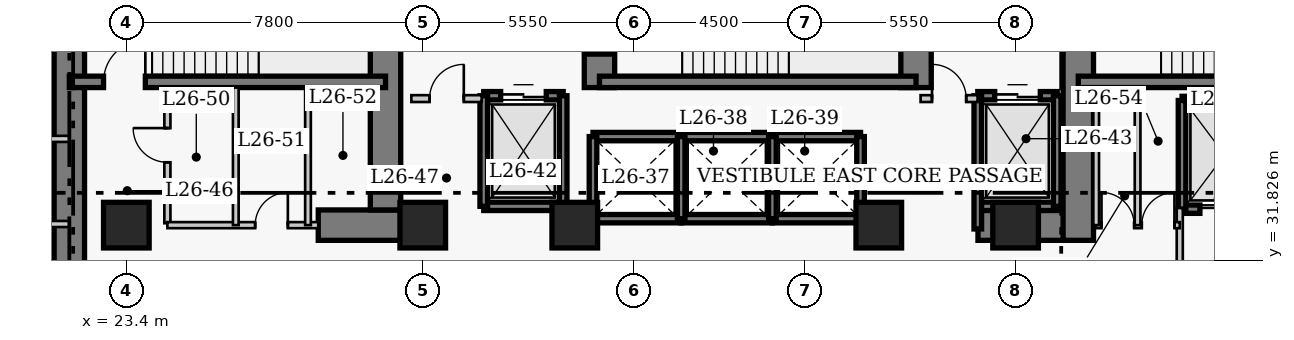
"""IFC4 building model, lengths in metres.
Left out: names, types, materials, properties, quantities, classifications, styles, units other than length and angle.
Written with IfcOpenShell. Run it as: python <this file> out.ifc"""

import sys

from ifc_helpers import new_model, si_unit, direction, frame, frame_2d, origin, origin_2d, place, context, subcontext, project, spatial, rectangle, extrude, element, fill, save


model = new_model("IFC4")
c1 = context("Model", 3, precision=1e-05, world=origin(), true_north=direction((0.0, 1.0)))
c2 = subcontext(c1, "Body", "Model", "MODEL_VIEW")
j1 = project(units=[si_unit("LENGTHUNIT", "METRE"), si_unit("PLANEANGLEUNIT", "RADIAN")], contexts=[c1])
p1 = place(None, origin())
s1 = spatial("IfcSite", under=j1, at=p1, CompositionType="ELEMENT")
p2 = place(p1, origin())
s2 = spatial("IfcBuilding", under=s1, at=p2, CompositionType="ELEMENT")
p3 = place(p2, frame((0.0, 0.0, 107.0)))
s3 = spatial("IfcBuildingStorey", under=s2, at=p3, CompositionType="ELEMENT", Elevation=107.0)
p4 = place(p3, frame((21.9, 27.05, 0.0), z_axis=(0.0, 0.0, 1.0), x_axis=(0.0, 1.0, 0.0)))
e1 = element("IfcWall", 1, at=p4, inside=s3, PredefinedType="SHEAR", context=c2, shape_type="SweptSolid", body=[
    extrude(rectangle(XDim=13.67, YDim=0.8, at=frame_2d((6.835, 0.0))), origin(), (0.0, 0.0, 1.0), 3.8),
])
p5 = place(p3, frame((28.45, 32.75, 0.0), z_axis=(0.0, 0.0, 1.0), x_axis=(1.0, 0.0, 0.0)))
e2 = element("IfcWall", 2, at=p5, inside=s3, PredefinedType="SHEAR", context=c2, shape_type="SweptSolid", body=[
    extrude(rectangle(XDim=2.4, YDim=0.8, at=frame_2d((1.2, 0.0))), origin(), (0.0, 0.0, 1.0), 3.8),
])
p6 = place(p3, frame((45.81, 32.75, 0.0), z_axis=(0.0, 0.0, 1.0), x_axis=(1.0, 0.0, 0.0)))
e3 = element("IfcWall", 3, at=p6, inside=s3, PredefinedType="SHEAR", context=c2, shape_type="SweptSolid", body=[
    extrude(rectangle(XDim=2.64, YDim=0.8, at=frame_2d((1.32, 0.0))), origin(), (0.0, 0.0, 1.0), 3.8),
])
p7 = place(p3, frame((30.22, 33.15, 0.0), z_axis=(0.0, 0.0, 1.0), x_axis=(0.0, 1.0, 0.0)))
e4 = element("IfcWall", 4, at=p7, inside=s3, PredefinedType="SHEAR", context=c2, shape_type="SweptSolid", body=[
    extrude(rectangle(XDim=7.17, YDim=0.8, at=frame_2d((3.585, 0.0))), origin(), (0.0, 0.0, 1.0), 3.8),
])
p8 = place(p3, frame((35.85, 36.37, 0.0), z_axis=(0.0, 0.0, 1.0), x_axis=(0.0, 1.0, 0.0)))
e5 = element("IfcWall", 5, at=p8, inside=s3, PredefinedType="SHEAR", context=c2, shape_type="SweptSolid", body=[
    extrude(rectangle(XDim=3.95, YDim=0.8, at=frame_2d((1.975, 0.0))), origin(), (0.0, 0.0, 1.0), 3.8),
])
p9 = place(p8, frame((0.88, 0.0, 0.0)))
e6 = element("IfcOpeningElement", 6, at=p9, cuts=e5, PredefinedType="OPENING", context=c2, shape_type="SweptSolid", body=[
    extrude(rectangle(XDim=1.1, YDim=2.15, at=frame_2d((0.55, 1.075))), frame((0.0, 0.41, 0.0), z_axis=(0.0, -1.0, 0.0), x_axis=(1.0, 0.0, 0.0)), (0.0, 0.0, 1.0), 0.82),
])
p10 = place(p3, frame((44.18, 36.37, 0.0), z_axis=(0.0, 0.0, 1.0), x_axis=(0.0, 1.0, 0.0)))
e7 = element("IfcWall", 7, at=p10, inside=s3, PredefinedType="SHEAR", context=c2, shape_type="SweptSolid", body=[
    extrude(rectangle(XDim=3.95, YDim=0.8, at=frame_2d((1.975, 0.0))), origin(), (0.0, 0.0, 1.0), 3.8),
])
p11 = place(p3, frame((48.45, 32.35, 0.0), z_axis=(0.0, 0.0, 1.0), x_axis=(0.0, 1.0, 0.0)))
e8 = element("IfcWall", 8, at=p11, inside=s3, PredefinedType="SHEAR", context=c2, shape_type="SweptSolid", body=[
    extrude(rectangle(XDim=7.97, YDim=0.8, at=frame_2d((3.985, 0.0))), origin(), (0.0, 0.0, 1.0), 3.8),
])
p12 = place(p11, frame((5.85, 0.0, 0.0)))
e9 = element("IfcOpeningElement", 9, at=p12, cuts=e8, PredefinedType="OPENING", context=c2, shape_type="SweptSolid", body=[
    extrude(rectangle(XDim=1.1, YDim=2.15, at=frame_2d((0.55, 1.075))), frame((0.0, 0.41, 0.0), z_axis=(0.0, -1.0, 0.0), x_axis=(1.0, 0.0, 0.0)), (0.0, 0.0, 1.0), 0.82),
])
p13 = place(p3, frame((21.9, 36.52, 0.0), z_axis=(0.0, 0.0, 1.0), x_axis=(1.0, 0.0, 0.0)))
e10 = element("IfcWall", 10, at=p13, inside=s3, PredefinedType="SHEAR", context=c2, shape_type="SweptSolid", body=[
    extrude(rectangle(XDim=8.32, YDim=0.3, at=frame_2d((4.16, 0.0))), origin(), (0.0, 0.0, 1.0), 3.8),
])
p14 = place(p13, frame((0.9, 0.0, 0.0)))
e11 = element("IfcOpeningElement", 11, at=p14, cuts=e10, PredefinedType="OPENING", context=c2, shape_type="SweptSolid", body=[
    extrude(rectangle(XDim=1.1, YDim=2.15, at=frame_2d((0.55, 1.075))), frame((0.0, 0.16, 0.0), z_axis=(0.0, -1.0, 0.0), x_axis=(1.0, 0.0, 0.0)), (0.0, 0.0, 1.0), 0.32),
])
p15 = place(p3, frame((35.85, 36.52, 0.0), z_axis=(0.0, 0.0, 1.0), x_axis=(1.0, 0.0, 0.0)))
e12 = element("IfcWall", 12, at=p15, inside=s3, PredefinedType="SHEAR", context=c2, shape_type="SweptSolid", body=[
    extrude(rectangle(XDim=8.33, YDim=0.3, at=frame_2d((4.165, 0.0))), origin(), (0.0, 0.0, 1.0), 3.8),
])
p16 = place(p3, frame((48.45, 36.52, 0.0), z_axis=(0.0, 0.0, 1.0), x_axis=(1.0, 0.0, 0.0)))
e13 = element("IfcWall", 13, at=p16, inside=s3, PredefinedType="SHEAR", context=c2, shape_type="SweptSolid", body=[
    extrude(rectangle(XDim=8.47, YDim=0.3, at=frame_2d((4.235, 0.0))), origin(), (0.0, 0.0, 1.0), 3.8),
])
for number, where, z_axis, x_axis in (
    (14, (23.4, 32.75, 0.0), (0.0, 0.0, 1.0), (1.0, 0.0, 0.0)),
    (15, (31.2, 32.75, 0.0), (0.0, 0.0, 1.0), (1.0, 0.0, 0.0)),
    (16, (35.2, 32.75, 0.0), (0.0, 0.0, 1.0), (1.0, 0.0, 0.0)),
    (17, (43.2, 32.75, 0.0), (0.0, 0.0, 1.0), (1.0, 0.0, 0.0)),
    (18, (46.8, 32.75, 0.0), (0.0, 0.0, 1.0), (1.0, 0.0, 0.0)),
):
    element("IfcColumn", number, at=place(p3, frame(where, z_axis=z_axis, x_axis=x_axis)), inside=s3, PredefinedType="COLUMN", context=c2, shape_type="SweptSolid", body=[
        extrude(rectangle(XDim=1.2, YDim=1.2, at=origin_2d()), origin(), (0.0, 0.0, 1.0), 3.8),
    ])
for number, where, z_axis, x_axis in (
    (19, (35.68, 35.08, 0.0), (0.0, 0.0, 1.0), (1.0, 0.0, 0.0)),
    (20, (35.68, 32.92, 0.0), (0.0, 0.0, 1.0), (1.0, 0.0, 0.0)),
):
    element("IfcWall", number, at=place(p3, frame(where, z_axis=z_axis, x_axis=x_axis)), inside=s3, PredefinedType="SHEAR", context=c2, shape_type="SweptSolid", body=[
        extrude(rectangle(XDim=2.32, YDim=0.22, at=frame_2d((1.16, 0.0))), origin(), (0.0, 0.0, 1.0), 3.8),
    ])
p17 = place(p3, frame((35.68, 32.92, 0.0), z_axis=(0.0, 0.0, 1.0), x_axis=(0.0, 1.0, 0.0)))
e21 = element("IfcWall", 21, at=p17, inside=s3, PredefinedType="SHEAR", context=c2, shape_type="SweptSolid", body=[
    extrude(rectangle(XDim=2.16, YDim=0.2, at=frame_2d((1.08, 0.0))), origin(), (0.0, 0.0, 1.0), 3.8),
])
for number, where, z_axis, x_axis in (
    (22, (38.0, 35.08, 0.0), (0.0, 0.0, 1.0), (1.0, 0.0, 0.0)),
    (23, (38.0, 32.92, 0.0), (0.0, 0.0, 1.0), (1.0, 0.0, 0.0)),
):
    element("IfcWall", number, at=place(p3, frame(where, z_axis=z_axis, x_axis=x_axis)), inside=s3, PredefinedType="SHEAR", context=c2, shape_type="SweptSolid", body=[
        extrude(rectangle(XDim=2.4, YDim=0.22, at=frame_2d((1.2, 0.0))), origin(), (0.0, 0.0, 1.0), 3.8),
    ])
p18 = place(p3, frame((38.0, 32.92, 0.0), z_axis=(0.0, 0.0, 1.0), x_axis=(0.0, 1.0, 0.0)))
e24 = element("IfcWall", 24, at=p18, inside=s3, PredefinedType="SHEAR", context=c2, shape_type="SweptSolid", body=[
    extrude(rectangle(XDim=2.16, YDim=0.2, at=frame_2d((1.08, 0.0))), origin(), (0.0, 0.0, 1.0), 3.8),
])
for number, where, z_axis, x_axis in (
    (25, (40.4, 35.08, 0.0), (0.0, 0.0, 1.0), (1.0, 0.0, 0.0)),
    (26, (40.4, 32.92, 0.0), (0.0, 0.0, 1.0), (1.0, 0.0, 0.0)),
):
    element("IfcWall", number, at=place(p3, frame(where, z_axis=z_axis, x_axis=x_axis)), inside=s3, PredefinedType="SHEAR", context=c2, shape_type="SweptSolid", body=[
        extrude(rectangle(XDim=2.32, YDim=0.22, at=frame_2d((1.16, 0.0))), origin(), (0.0, 0.0, 1.0), 3.8),
    ])
for number, where, z_axis, x_axis in (
    (27, (40.4, 32.92, 0.0), (0.0, 0.0, 1.0), (0.0, 1.0, 0.0)),
    (28, (42.72, 32.92, 0.0), (0.0, 0.0, 1.0), (0.0, 1.0, 0.0)),
):
    element("IfcWall", number, at=place(p3, frame(where, z_axis=z_axis, x_axis=x_axis)), inside=s3, PredefinedType="SHEAR", context=c2, shape_type="SweptSolid", body=[
        extrude(rectangle(XDim=2.16, YDim=0.2, at=frame_2d((1.08, 0.0))), origin(), (0.0, 0.0, 1.0), 3.8),
    ])
p19 = place(p3, frame((51.18, 36.03, 0.0), z_axis=(0.0, 0.0, 1.0), x_axis=(1.0, 0.0, 0.0)))
e29 = element("IfcWall", 29, at=p19, inside=s3, PredefinedType="SHEAR", context=c2, shape_type="SweptSolid", body=[
    extrude(rectangle(XDim=2.42, YDim=0.22, at=frame_2d((1.21, 0.0))), origin(), (0.0, 0.0, 1.0), 3.8),
])
p20 = place(p3, frame((51.18, 33.17, 0.0), z_axis=(0.0, 0.0, 1.0), x_axis=(1.0, 0.0, 0.0)))
e30 = element("IfcWall", 30, at=p20, inside=s3, PredefinedType="SHEAR", context=c2, shape_type="SweptSolid", body=[
    extrude(rectangle(XDim=2.42, YDim=0.22, at=frame_2d((1.21, 0.0))), origin(), (0.0, 0.0, 1.0), 3.8),
])
p21 = place(p20, frame((0.47, 0.0, 0.0)))
e31 = element("IfcOpeningElement", 31, at=p21, cuts=e30, PredefinedType="OPENING", context=c2, shape_type="SweptSolid", body=[
    extrude(rectangle(XDim=1.3, YDim=2.15, at=frame_2d((0.65, 1.075))), frame((0.0, 0.12, 0.0), z_axis=(0.0, -1.0, 0.0), x_axis=(1.0, 0.0, 0.0)), (0.0, 0.0, 1.0), 0.24),
])
p22 = place(p3, frame((51.18, 33.17, 0.0), z_axis=(0.0, 0.0, 1.0), x_axis=(0.0, 1.0, 0.0)))
e32 = element("IfcWall", 32, at=p22, inside=s3, PredefinedType="SHEAR", context=c2, shape_type="SweptSolid", body=[
    extrude(rectangle(XDim=2.86, YDim=0.2, at=frame_2d((1.43, 0.0))), origin(), (0.0, 0.0, 1.0), 3.8),
])
p23 = place(p3, frame((32.805, 36.155, 0.0), z_axis=(0.0, 0.0, 1.0), x_axis=(1.0, 0.0, 0.0)))
e33 = element("IfcWall", 33, at=p23, inside=s3, PredefinedType="SHEAR", context=c2, shape_type="SweptSolid", body=[
    extrude(rectangle(XDim=2.09, YDim=0.22, at=frame_2d((1.045, 0.0))), origin(), (0.0, 0.0, 1.0), 3.8),
])
p24 = place(p23, frame((0.445, 0.0, 0.0)))
e34 = element("IfcOpeningElement", 34, at=p24, cuts=e33, PredefinedType="OPENING", context=c2, shape_type="SweptSolid", body=[
    extrude(rectangle(XDim=1.2, YDim=2.15, at=frame_2d((0.6, 1.075))), frame((0.0, 0.12, 0.0), z_axis=(0.0, -1.0, 0.0), x_axis=(1.0, 0.0, 0.0)), (0.0, 0.0, 1.0), 0.24),
])
p25 = place(p3, frame((32.805, 33.245, 0.0), z_axis=(0.0, 0.0, 1.0), x_axis=(1.0, 0.0, 0.0)))
e35 = element("IfcWall", 35, at=p25, inside=s3, PredefinedType="SHEAR", context=c2, shape_type="SweptSolid", body=[
    extrude(rectangle(XDim=2.09, YDim=0.22, at=frame_2d((1.045, 0.0))), origin(), (0.0, 0.0, 1.0), 3.8),
])
for number, where, z_axis, x_axis in (
    (36, (32.805, 33.245, 0.0), (0.0, 0.0, 1.0), (0.0, 1.0, 0.0)),
    (37, (34.895, 33.245, 0.0), (0.0, 0.0, 1.0), (0.0, 1.0, 0.0)),
):
    element("IfcWall", number, at=place(p3, frame(where, z_axis=z_axis, x_axis=x_axis)), inside=s3, PredefinedType="SHEAR", context=c2, shape_type="SweptSolid", body=[
        extrude(rectangle(XDim=2.91, YDim=0.2, at=frame_2d((1.455, 0.0))), origin(), (0.0, 0.0, 1.0), 3.8),
    ])
p26 = place(p3, frame((45.805, 36.155, 0.0), z_axis=(0.0, 0.0, 1.0), x_axis=(1.0, 0.0, 0.0)))
e38 = element("IfcWall", 38, at=p26, inside=s3, PredefinedType="SHEAR", context=c2, shape_type="SweptSolid", body=[
    extrude(rectangle(XDim=2.09, YDim=0.22, at=frame_2d((1.045, 0.0))), origin(), (0.0, 0.0, 1.0), 3.8),
])
p27 = place(p26, frame((0.445, 0.0, 0.0)))
e39 = element("IfcOpeningElement", 39, at=p27, cuts=e38, PredefinedType="OPENING", context=c2, shape_type="SweptSolid", body=[
    extrude(rectangle(XDim=1.2, YDim=2.15, at=frame_2d((0.6, 1.075))), frame((0.0, 0.12, 0.0), z_axis=(0.0, -1.0, 0.0), x_axis=(1.0, 0.0, 0.0)), (0.0, 0.0, 1.0), 0.24),
])
p28 = place(p3, frame((45.805, 33.245, 0.0), z_axis=(0.0, 0.0, 1.0), x_axis=(1.0, 0.0, 0.0)))
e40 = element("IfcWall", 40, at=p28, inside=s3, PredefinedType="SHEAR", context=c2, shape_type="SweptSolid", body=[
    extrude(rectangle(XDim=2.09, YDim=0.22, at=frame_2d((1.045, 0.0))), origin(), (0.0, 0.0, 1.0), 3.8),
])
p29 = place(p3, frame((45.805, 32.65, 0.0), z_axis=(0.0, 0.0, 1.0), x_axis=(0.0, 1.0, 0.0)))
e41 = element("IfcWall", 41, at=p29, inside=s3, PredefinedType="SHEAR", context=c2, shape_type="SweptSolid", body=[
    extrude(rectangle(XDim=3.505, YDim=0.2, at=frame_2d((1.752, 0.0))), origin(), (0.0, 0.0, 1.0), 3.8),
])
p30 = place(p3, frame((47.895, 33.245, 0.0), z_axis=(0.0, 0.0, 1.0), x_axis=(0.0, 1.0, 0.0)))
e42 = element("IfcWall", 42, at=p30, inside=s3, PredefinedType="SHEAR", context=c2, shape_type="SweptSolid", body=[
    extrude(rectangle(XDim=2.91, YDim=0.2, at=frame_2d((1.455, 0.0))), origin(), (0.0, 0.0, 1.0), 3.8),
])
p31 = place(p3, frame((30.9, 36.08, 0.0), z_axis=(0.0, 0.0, 1.0), x_axis=(1.0, 0.0, 0.0)))
e43 = element("IfcWall", 43, at=p31, inside=s3, PredefinedType="PARTITIONING", context=c2, shape_type="SweptSolid", body=[
    extrude(rectangle(XDim=1.85, YDim=0.18, at=frame_2d((0.925, 0.0))), origin(), (0.0, 0.0, 1.0), 3.54),
])
p32 = place(p31, frame((0.48, 0.0, 0.0)))
e44 = element("IfcOpeningElement", 44, at=p32, cuts=e43, PredefinedType="OPENING", context=c2, shape_type="SweptSolid", body=[
    extrude(rectangle(XDim=0.9, YDim=2.15, at=frame_2d((0.45, 1.075))), frame((0.0, 0.1, 0.0), z_axis=(0.0, -1.0, 0.0), x_axis=(1.0, 0.0, 0.0)), (0.0, 0.0, 1.0), 0.2),
])
p33 = place(p3, frame((44.3, 36.08, 0.0), z_axis=(0.0, 0.0, 1.0), x_axis=(1.0, 0.0, 0.0)))
e45 = element("IfcWall", 45, at=p33, inside=s3, PredefinedType="PARTITIONING", context=c2, shape_type="SweptSolid", body=[
    extrude(rectangle(XDim=1.5, YDim=0.18, at=frame_2d((0.75, 0.0))), origin(), (0.0, 0.0, 1.0), 3.54),
])
p34 = place(p33, frame((0.3, 0.0, 0.0)))
e46 = element("IfcOpeningElement", 46, at=p34, cuts=e45, PredefinedType="OPENING", context=c2, shape_type="SweptSolid", body=[
    extrude(rectangle(XDim=0.9, YDim=2.15, at=frame_2d((0.45, 1.075))), frame((0.0, 0.1, 0.0), z_axis=(0.0, -1.0, 0.0), x_axis=(1.0, 0.0, 0.0)), (0.0, 0.0, 1.0), 0.2),
])
p35 = place(p3, frame((24.48, 32.8, 0.0), z_axis=(0.0, 0.0, 1.0), x_axis=(0.0, 1.0, 0.0)))
e47 = element("IfcWall", 47, at=p35, inside=s3, PredefinedType="PARTITIONING", context=c2, shape_type="SweptSolid", body=[
    extrude(rectangle(XDim=3.57, YDim=0.16, at=frame_2d((1.785, 0.0))), origin(), (0.0, 0.0, 1.0), 3.54),
])
p36 = place(p35, frame((1.604, 0.0, 0.0)))
e48 = element("IfcOpeningElement", 48, at=p36, cuts=e47, PredefinedType="OPENING", context=c2, shape_type="SweptSolid", body=[
    extrude(rectangle(XDim=0.9, YDim=2.1, at=frame_2d((0.45, 1.05))), frame((0.0, 0.09, 0.0), z_axis=(0.0, -1.0, 0.0), x_axis=(1.0, 0.0, 0.0)), (0.0, 0.0, 1.0), 0.18),
])
p37 = place(p3, frame((51.12, 29.5, 0.0), z_axis=(0.0, 0.0, 1.0), x_axis=(0.0, 1.0, 0.0)))
e49 = element("IfcWall", 49, at=p37, inside=s3, PredefinedType="PARTITIONING", context=c2, shape_type="SweptSolid", body=[
    extrude(rectangle(XDim=3.7, YDim=0.16, at=frame_2d((1.85, 0.0))), origin(), (0.0, 0.0, 1.0), 3.54),
])
p38 = place(p37, frame((0.9, 0.0, 0.0)))
e50 = element("IfcOpeningElement", 50, at=p38, cuts=e49, PredefinedType="OPENING", context=c2, shape_type="SweptSolid", body=[
    extrude(rectangle(XDim=1.1, YDim=2.15, at=frame_2d((0.55, 1.075))), frame((0.0, 0.09, 0.0), z_axis=(0.0, -1.0, 0.0), x_axis=(1.0, 0.0, 0.0)), (0.0, 0.0, 1.0), 0.18),
])
p39 = place(p3, frame((24.48, 32.75, 0.0), z_axis=(0.0, 0.0, 1.0), x_axis=(1.0, 0.0, 0.0)))
e51 = element("IfcWall", 51, at=p39, inside=s3, PredefinedType="PARTITIONING", context=c2, shape_type="SweptSolid", body=[
    extrude(rectangle(XDim=3.97, YDim=0.16, at=frame_2d((1.985, 0.0))), origin(), (0.0, 0.0, 1.0), 3.54),
])
p40 = place(p39, frame((2.31, 0.0, 0.0)))
e52 = element("IfcOpeningElement", 52, at=p40, cuts=e51, PredefinedType="OPENING", context=c2, shape_type="SweptSolid", body=[
    extrude(rectangle(XDim=0.86, YDim=2.05, at=frame_2d((0.43, 1.025))), frame((0.0, 0.09, 0.0), z_axis=(0.0, -1.0, 0.0), x_axis=(1.0, 0.0, 0.0)), (0.0, 0.0, 1.0), 0.18),
])
p41 = place(p3, frame((48.92, 32.75, 0.0), z_axis=(0.0, 0.0, 1.0), x_axis=(1.0, 0.0, 0.0)))
e53 = element("IfcWall", 53, at=p41, inside=s3, PredefinedType="PARTITIONING", context=c2, shape_type="SweptSolid", body=[
    extrude(rectangle(XDim=2.2, YDim=0.16, at=frame_2d((1.1, 0.0))), origin(), (0.0, 0.0, 1.0), 3.54),
])
p42 = place(p41, frame((0.14, 0.0, 0.0)))
e54 = element("IfcOpeningElement", 54, at=p42, cuts=e53, PredefinedType="OPENING", context=c2, shape_type="SweptSolid", body=[
    extrude(rectangle(XDim=0.86, YDim=2.05, at=frame_2d((0.43, 1.025))), frame((0.0, 0.09, 0.0), z_axis=(0.0, -1.0, 0.0), x_axis=(1.0, 0.0, 0.0)), (0.0, 0.0, 1.0), 0.18),
])
p43 = place(p41, frame((1.2, 0.0, 0.0)))
e55 = element("IfcOpeningElement", 55, at=p43, cuts=e53, PredefinedType="OPENING", context=c2, shape_type="SweptSolid", body=[
    extrude(rectangle(XDim=0.86, YDim=2.05, at=frame_2d((0.43, 1.025))), frame((0.0, 0.09, 0.0), z_axis=(0.0, -1.0, 0.0), x_axis=(1.0, 0.0, 0.0)), (0.0, 0.0, 1.0), 0.18),
])
for number, where, z_axis, x_axis in (
    (56, (48.92, 32.75, 0.0), (0.0, 0.0, 1.0), (0.0, 1.0, 0.0)),
    (57, (26.28, 32.75, 0.0), (0.0, 0.0, 1.0), (0.0, 1.0, 0.0)),
    (58, (28.18, 32.75, 0.0), (0.0, 0.0, 1.0), (0.0, 1.0, 0.0)),
    (59, (50.01, 32.75, 0.0), (0.0, 0.0, 1.0), (0.0, 1.0, 0.0)),
):
    element("IfcWall", number, at=place(p3, frame(where, z_axis=z_axis, x_axis=x_axis)), inside=s3, PredefinedType="PARTITIONING", context=c2, shape_type="SweptSolid", body=[
        extrude(rectangle(XDim=3.62, YDim=0.15, at=frame_2d((1.81, 0.0))), origin(), (0.0, 0.0, 1.0), 3.54),
    ])
for number, where, z_axis, x_axis in (
    (60, (19.41, 35.02, 0.0), (0.0, 0.0, 1.0), (1.0, 0.0, 0.0)),
    (61, (19.41, 32.78, 0.0), (0.0, 0.0, 1.0), (1.0, 0.0, 0.0)),
):
    element("IfcWall", number, at=place(p3, frame(where, z_axis=z_axis, x_axis=x_axis)), inside=s3, PredefinedType="PARTITIONING", context=c2, shape_type="SweptSolid", body=[
        extrude(rectangle(XDim=2.49, YDim=0.16, at=frame_2d((1.245, 0.0))), origin(), (0.0, 0.0, 1.0), 3.54),
    ])
p44 = place(p21, origin())
e62 = element("IfcDoor", 62, at=p44, inside=s3, OperationType="DOUBLE_DOOR_SLIDING", PredefinedType="DOOR", context=c2, shape_type="SweptSolid", body=[
    extrude(rectangle(XDim=1.3, YDim=2.15, at=frame_2d((0.65, 1.075))), frame((0.0, 0.025, 0.0), z_axis=(0.0, -1.0, 0.0), x_axis=(1.0, 0.0, 0.0)), (0.0, 0.0, 1.0), 0.05),
])
fill(e31, e62)
p45 = place(p24, origin())
e63 = element("IfcDoor", 63, at=p45, inside=s3, OperationType="DOUBLE_DOOR_SLIDING", PredefinedType="DOOR", context=c2, shape_type="SweptSolid", body=[
    extrude(rectangle(XDim=1.2, YDim=2.15, at=frame_2d((0.6, 1.075))), frame((0.0, 0.025, 0.0), z_axis=(0.0, -1.0, 0.0), x_axis=(1.0, 0.0, 0.0)), (0.0, 0.0, 1.0), 0.05),
])
fill(e34, e63)
p46 = place(p27, origin())
e64 = element("IfcDoor", 64, at=p46, inside=s3, OperationType="DOUBLE_DOOR_SLIDING", PredefinedType="DOOR", context=c2, shape_type="SweptSolid", body=[
    extrude(rectangle(XDim=1.2, YDim=2.15, at=frame_2d((0.6, 1.075))), frame((0.0, 0.025, 0.0), z_axis=(0.0, -1.0, 0.0), x_axis=(1.0, 0.0, 0.0)), (0.0, 0.0, 1.0), 0.05),
])
fill(e39, e64)
p47 = place(p32, origin())
e65 = element("IfcDoor", 65, at=p47, inside=s3, OperationType="SINGLE_SWING_RIGHT", PredefinedType="DOOR", context=c2, shape_type="SweptSolid", body=[
    extrude(rectangle(XDim=0.9, YDim=2.15, at=frame_2d((0.45, 1.075))), frame((0.0, 0.025, 0.0), z_axis=(0.0, -1.0, 0.0), x_axis=(1.0, 0.0, 0.0)), (0.0, 0.0, 1.0), 0.05),
])
fill(e44, e65)
p48 = place(p34, origin())
e66 = element("IfcDoor", 66, at=p48, inside=s3, OperationType="SINGLE_SWING_LEFT", PredefinedType="DOOR", context=c2, shape_type="SweptSolid", body=[
    extrude(rectangle(XDim=0.9, YDim=2.15, at=frame_2d((0.45, 1.075))), frame((0.0, 0.025, 0.0), z_axis=(0.0, -1.0, 0.0), x_axis=(1.0, 0.0, 0.0)), (0.0, 0.0, 1.0), 0.05),
])
fill(e46, e66)
p49 = place(p36, origin())
e67 = element("IfcDoor", 67, at=p49, inside=s3, OperationType="SINGLE_SWING_RIGHT", PredefinedType="DOOR", context=c2, shape_type="SweptSolid", body=[
    extrude(rectangle(XDim=0.9, YDim=2.1, at=frame_2d((0.45, 1.05))), frame((0.0, 0.025, 0.0), z_axis=(0.0, -1.0, 0.0), x_axis=(1.0, 0.0, 0.0)), (0.0, 0.0, 1.0), 0.05),
])
fill(e48, e67)
p50 = place(p40, origin())
e68 = element("IfcDoor", 68, at=p50, inside=s3, OperationType="SINGLE_SWING_RIGHT", PredefinedType="DOOR", context=c2, shape_type="SweptSolid", body=[
    extrude(rectangle(XDim=0.86, YDim=2.05, at=frame_2d((0.43, 1.025))), frame((0.0, 0.025, 0.0), z_axis=(0.0, -1.0, 0.0), x_axis=(1.0, 0.0, 0.0)), (0.0, 0.0, 1.0), 0.05),
])
fill(e52, e68)
p51 = place(p42, origin())
e69 = element("IfcDoor", 69, at=p51, inside=s3, OperationType="SINGLE_SWING_LEFT", PredefinedType="DOOR", context=c2, shape_type="SweptSolid", body=[
    extrude(rectangle(XDim=0.86, YDim=2.05, at=frame_2d((0.43, 1.025))), frame((0.0, 0.025, 0.0), z_axis=(0.0, -1.0, 0.0), x_axis=(1.0, 0.0, 0.0)), (0.0, 0.0, 1.0), 0.05),
])
fill(e54, e69)
p52 = place(p43, origin())
e70 = element("IfcDoor", 70, at=p52, inside=s3, OperationType="SINGLE_SWING_RIGHT", PredefinedType="DOOR", context=c2, shape_type="SweptSolid", body=[
    extrude(rectangle(XDim=0.86, YDim=2.05, at=frame_2d((0.43, 1.025))), frame((0.0, 0.025, 0.0), z_axis=(0.0, -1.0, 0.0), x_axis=(1.0, 0.0, 0.0)), (0.0, 0.0, 1.0), 0.05),
])
fill(e55, e70)
p53 = place(p14, origin())
e71 = element("IfcDoor", 71, at=p53, inside=s3, OperationType="SINGLE_SWING_RIGHT", PredefinedType="DOOR", context=c2, shape_type="SweptSolid", body=[
    extrude(rectangle(XDim=1.1, YDim=2.15, at=frame_2d((0.55, 1.075))), frame((0.0, 0.025, 0.0), z_axis=(0.0, -1.0, 0.0), x_axis=(1.0, 0.0, 0.0)), (0.0, 0.0, 1.0), 0.05),
])
fill(e11, e71)
p54 = place(p9, origin())
e72 = element("IfcDoor", 72, at=p54, inside=s3, OperationType="SINGLE_SWING_RIGHT", PredefinedType="DOOR", context=c2, shape_type="SweptSolid", body=[
    extrude(rectangle(XDim=1.1, YDim=2.15, at=frame_2d((0.55, 1.075))), frame((0.0, 0.025, 0.0), z_axis=(0.0, -1.0, 0.0), x_axis=(1.0, 0.0, 0.0)), (0.0, 0.0, 1.0), 0.05),
])
fill(e6, e72)
save(model, sys.argv[1])
